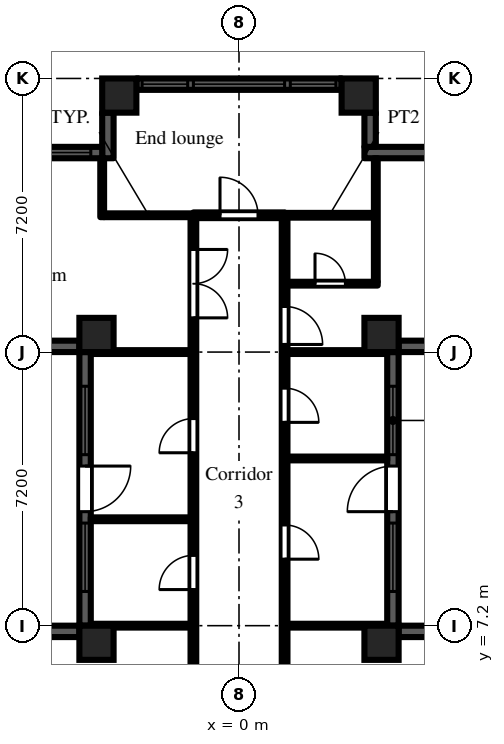
"""IFC4 building model, lengths in metres.
Left out: names, types, materials, properties, quantities, classifications, styles, units other than length and angle.
Written with IfcOpenShell. Run it as: python <this file> out.ifc"""

import sys

from ifc_helpers import new_model, si_unit, direction, frame, frame_2d, origin, origin_2d, place, context, subcontext, project, spatial, rectangle, extrude, element, fill, save


model = new_model("IFC4")
c1 = context("Model", 3, precision=1e-05, world=origin(), true_north=direction((0.0, 1.0)))
c2 = subcontext(c1, "Body", "Model", "MODEL_VIEW")
j1 = project(units=[si_unit("LENGTHUNIT", "METRE"), si_unit("PLANEANGLEUNIT", "RADIAN")], contexts=[c1])
p1 = place(None, origin())
s1 = spatial("IfcSite", under=j1, at=p1, CompositionType="ELEMENT")
p2 = place(p1, origin())
s2 = spatial("IfcBuilding", under=s1, at=p2, CompositionType="ELEMENT")
p3 = place(p2, frame((0.0, 0.0, 108.9)))
s3 = spatial("IfcBuildingStorey", under=s2, at=p3, CompositionType="ELEMENT", Elevation=108.9)
for number, where, z_axis, x_axis in (
    (1, (-3.75, 6.75, 0.0), (0.0, 0.0, 1.0), (1.0, 0.0, 0.0)),
    (2, (-3.75, 14.85, 0.0), (0.0, 0.0, 1.0), (1.0, 0.0, 0.0)),
    (3, (-3.15, 21.15, 0.0), (0.0, 0.0, 1.0), (1.0, 0.0, 0.0)),
    (4, (3.15, 21.15, 0.0), (0.0, 0.0, 1.0), (1.0, 0.0, 0.0)),
    (5, (3.75, 6.75, 0.0), (0.0, 0.0, 1.0), (1.0, 0.0, 0.0)),
    (6, (3.75, 14.85, 0.0), (0.0, 0.0, 1.0), (1.0, 0.0, 0.0)),
):
    element("IfcColumn", number, at=place(p3, frame(where, z_axis=z_axis, x_axis=x_axis)), inside=s3, PredefinedType="COLUMN", context=c2, shape_type="SweptSolid", body=[
        extrude(rectangle(XDim=0.9, YDim=0.9, at=origin_2d()), origin(), (0.0, 0.0, 1.0), 3.0),
    ])
p4 = place(p3, frame((7.2, 7.05, 0.0), z_axis=(0.0, 0.0, 1.0), x_axis=(-1.0, 0.0, 0.0)))
e7 = element("IfcWall", 7, at=p4, inside=s3, PredefinedType="SOLIDWALL", context=c2, shape_type="SweptSolid", body=[
    extrude(rectangle(XDim=3.0, YDim=0.3, at=frame_2d((1.5, 0.0))), origin(), (0.0, 0.0, 1.0), 2.55),
])
p5 = place(p3, frame((4.05, 7.2, 0.0), z_axis=(0.0, 0.0, 1.0), x_axis=(0.0, 1.0, 0.0)))
e8 = element("IfcWall", 8, at=p5, inside=s3, PredefinedType="SOLIDWALL", context=c2, shape_type="SweptSolid", body=[
    extrude(rectangle(XDim=7.2, YDim=0.3, at=frame_2d((3.6, 0.0))), origin(), (0.0, 0.0, 1.0), 2.55),
])
p6 = place(p5, frame((3.0, 0.0, 0.0)))
e9 = element("IfcOpeningElement", 9, at=p6, cuts=e8, PredefinedType="OPENING", context=c2, shape_type="SweptSolid", body=[
    extrude(rectangle(XDim=1.2, YDim=2.05, at=frame_2d((0.6, 1.025))), frame((0.0, 0.16, 0.0), z_axis=(0.0, -1.0, 0.0), x_axis=(1.0, 0.0, 0.0)), (0.0, 0.0, 1.0), 0.32),
])
p7 = place(p5, frame((0.9, 0.0, 0.2)))
e10 = element("IfcOpeningElement", 10, at=p7, cuts=e8, PredefinedType="OPENING", context=c2, shape_type="SweptSolid", body=[
    extrude(rectangle(XDim=1.8, YDim=1.85, at=frame_2d((0.9, 0.925))), frame((0.0, 0.16, 0.0), z_axis=(0.0, -1.0, 0.0), x_axis=(1.0, 0.0, 0.0)), (0.0, 0.0, 1.0), 0.32),
])
p8 = place(p5, frame((4.5, 0.0, 0.2)))
e11 = element("IfcOpeningElement", 11, at=p8, cuts=e8, PredefinedType="OPENING", context=c2, shape_type="SweptSolid", body=[
    extrude(rectangle(XDim=1.8, YDim=1.85, at=frame_2d((0.9, 0.925))), frame((0.0, 0.16, 0.0), z_axis=(0.0, -1.0, 0.0), x_axis=(1.0, 0.0, 0.0)), (0.0, 0.0, 1.0), 0.32),
])
p9 = place(p3, frame((4.2, 14.55, 0.0), z_axis=(0.0, 0.0, 1.0), x_axis=(1.0, 0.0, 0.0)))
e12 = element("IfcWall", 12, at=p9, inside=s3, PredefinedType="SOLIDWALL", context=c2, shape_type="SweptSolid", body=[
    extrude(rectangle(XDim=2.1, YDim=0.3, at=frame_2d((1.05, 0.0))), origin(), (0.0, 0.0, 1.0), 2.55),
])
p10 = place(p3, frame((5.1, 19.65, 0.0), z_axis=(0.0, 0.0, 1.0), x_axis=(-1.0, 0.0, 0.0)))
e13 = element("IfcWall", 13, at=p10, inside=s3, PredefinedType="SOLIDWALL", context=c2, shape_type="SweptSolid", body=[
    extrude(rectangle(XDim=1.8, YDim=0.3, at=frame_2d((0.9, 0.0))), origin(), (0.0, 0.0, 1.0), 2.55),
])
p11 = place(p3, frame((3.45, 19.8, 0.0), z_axis=(0.0, 0.0, 1.0), x_axis=(0.0, 1.0, 0.0)))
e14 = element("IfcWall", 14, at=p11, inside=s3, PredefinedType="SOLIDWALL", context=c2, shape_type="SweptSolid", body=[
    extrude(rectangle(XDim=0.9, YDim=0.3, at=frame_2d((0.45, 0.0))), origin(), (0.0, 0.0, 1.0), 2.55),
])
p12 = place(p3, frame((2.7, 21.45, 0.0), z_axis=(0.0, 0.0, 1.0), x_axis=(-1.0, 0.0, 0.0)))
e15 = element("IfcWall", 15, at=p12, inside=s3, PredefinedType="SOLIDWALL", context=c2, shape_type="SweptSolid", body=[
    extrude(rectangle(XDim=5.4, YDim=0.3, at=frame_2d((2.7, 0.0))), origin(), (0.0, 0.0, 1.0), 2.2),
])
p13 = place(p12, frame((1.5, 0.0, 0.2)))
e16 = element("IfcOpeningElement", 16, at=p13, cuts=e15, PredefinedType="OPENING", context=c2, shape_type="SweptSolid", body=[
    extrude(rectangle(XDim=2.4, YDim=1.85, at=frame_2d((1.2, 0.925))), frame((0.0, 0.16, 0.0), z_axis=(0.0, -1.0, 0.0), x_axis=(1.0, 0.0, 0.0)), (0.0, 0.0, 1.0), 0.32),
])
p14 = place(p12, frame((0.15, 0.0, 0.2)))
e17 = element("IfcOpeningElement", 17, at=p14, cuts=e15, PredefinedType="OPENING", context=c2, shape_type="SweptSolid", body=[
    extrude(rectangle(XDim=1.2, YDim=1.85, at=frame_2d((0.6, 0.925))), frame((0.0, 0.16, 0.0), z_axis=(0.0, -1.0, 0.0), x_axis=(1.0, 0.0, 0.0)), (0.0, 0.0, 1.0), 0.32),
])
p15 = place(p12, frame((4.05, 0.0, 0.2)))
e18 = element("IfcOpeningElement", 18, at=p15, cuts=e15, PredefinedType="OPENING", context=c2, shape_type="SweptSolid", body=[
    extrude(rectangle(XDim=1.2, YDim=1.85, at=frame_2d((0.6, 0.925))), frame((0.0, 0.16, 0.0), z_axis=(0.0, -1.0, 0.0), x_axis=(1.0, 0.0, 0.0)), (0.0, 0.0, 1.0), 0.32),
])
p16 = place(p3, frame((-3.45, 20.7, 0.0), z_axis=(0.0, 0.0, 1.0), x_axis=(0.0, -1.0, 0.0)))
e19 = element("IfcWall", 19, at=p16, inside=s3, PredefinedType="SOLIDWALL", context=c2, shape_type="SweptSolid", body=[
    extrude(rectangle(XDim=1.2, YDim=0.3, at=frame_2d((0.6, 0.0))), origin(), (0.0, 0.0, 1.0), 2.55),
])
p17 = place(p3, frame((-3.6, 19.65, 0.0), z_axis=(0.0, 0.0, 1.0), x_axis=(-1.0, 0.0, 0.0)))
e20 = element("IfcWall", 20, at=p17, inside=s3, PredefinedType="SOLIDWALL", context=c2, shape_type="SweptSolid", body=[
    extrude(rectangle(XDim=1.8, YDim=0.3, at=frame_2d((0.9, 0.0))), origin(), (0.0, 0.0, 1.0), 2.55),
])
p18 = place(p17, frame((0.3, 0.0, 0.2)))
e21 = element("IfcOpeningElement", 21, at=p18, cuts=e20, PredefinedType="OPENING", context=c2, shape_type="SweptSolid", body=[
    extrude(rectangle(XDim=1.2, YDim=1.85, at=frame_2d((0.6, 0.925))), frame((0.0, 0.16, 0.0), z_axis=(0.0, -1.0, 0.0), x_axis=(1.0, 0.0, 0.0)), (0.0, 0.0, 1.0), 0.32),
])
p19 = place(p3, frame((-6.3, 14.55, 0.0), z_axis=(0.0, 0.0, 1.0), x_axis=(1.0, 0.0, 0.0)))
e22 = element("IfcWall", 22, at=p19, inside=s3, PredefinedType="SOLIDWALL", context=c2, shape_type="SweptSolid", body=[
    extrude(rectangle(XDim=2.1, YDim=0.3, at=frame_2d((1.05, 0.0))), origin(), (0.0, 0.0, 1.0), 2.55),
])
p20 = place(p3, frame((-4.05, 14.4, 0.0), z_axis=(0.0, 0.0, 1.0), x_axis=(0.0, -1.0, 0.0)))
e23 = element("IfcWall", 23, at=p20, inside=s3, PredefinedType="SOLIDWALL", context=c2, shape_type="SweptSolid", body=[
    extrude(rectangle(XDim=7.2, YDim=0.3, at=frame_2d((3.6, 0.0))), origin(), (0.0, 0.0, 1.0), 2.55),
])
p21 = place(p20, frame((3.0, 0.0, 0.0)))
e24 = element("IfcOpeningElement", 24, at=p21, cuts=e23, PredefinedType="OPENING", context=c2, shape_type="SweptSolid", body=[
    extrude(rectangle(XDim=1.2, YDim=2.05, at=frame_2d((0.6, 1.025))), frame((0.0, 0.16, 0.0), z_axis=(0.0, -1.0, 0.0), x_axis=(1.0, 0.0, 0.0)), (0.0, 0.0, 1.0), 0.32),
])
p22 = place(p20, frame((0.9, 0.0, 0.2)))
e25 = element("IfcOpeningElement", 25, at=p22, cuts=e23, PredefinedType="OPENING", context=c2, shape_type="SweptSolid", body=[
    extrude(rectangle(XDim=1.8, YDim=1.85, at=frame_2d((0.9, 0.925))), frame((0.0, 0.16, 0.0), z_axis=(0.0, -1.0, 0.0), x_axis=(1.0, 0.0, 0.0)), (0.0, 0.0, 1.0), 0.32),
])
p23 = place(p20, frame((4.5, 0.0, 0.2)))
e26 = element("IfcOpeningElement", 26, at=p23, cuts=e23, PredefinedType="OPENING", context=c2, shape_type="SweptSolid", body=[
    extrude(rectangle(XDim=1.8, YDim=1.85, at=frame_2d((0.9, 0.925))), frame((0.0, 0.16, 0.0), z_axis=(0.0, -1.0, 0.0), x_axis=(1.0, 0.0, 0.0)), (0.0, 0.0, 1.0), 0.32),
])
p24 = place(p3, frame((-4.2, 7.05, 0.0), z_axis=(0.0, 0.0, 1.0), x_axis=(-1.0, 0.0, 0.0)))
e27 = element("IfcWall", 27, at=p24, inside=s3, PredefinedType="SOLIDWALL", context=c2, shape_type="SweptSolid", body=[
    extrude(rectangle(XDim=3.0, YDim=0.3, at=frame_2d((1.5, 0.0))), origin(), (0.0, 0.0, 1.0), 2.55),
])
for number, where, z_axis, x_axis in (
    (28, (-3.9, 7.2, 0.0), (0.0, 0.0, 1.0), (1.0, 0.0, 0.0)),
    (29, (-3.9, 10.0, 0.0), (0.0, 0.0, 1.0), (1.0, 0.0, 0.0)),
    (30, (-3.9, 14.4, 0.0), (0.0, 0.0, 1.0), (1.0, 0.0, 0.0)),
):
    element("IfcWall", number, at=place(p3, frame(where, z_axis=z_axis, x_axis=x_axis)), inside=s3, PredefinedType="PARTITIONING", context=c2, shape_type="SweptSolid", body=[
        extrude(rectangle(XDim=2.625, YDim=0.1, at=frame_2d((1.312, 0.0))), origin(), (0.0, 0.0, 1.0), 2.55),
    ])
p25 = place(p3, frame((-3.6, 17.95, 0.0), z_axis=(0.0, 0.0, 1.0), x_axis=(0.0, 1.0, 0.0)))
e31 = element("IfcWall", 31, at=p25, inside=s3, PredefinedType="PARTITIONING", context=c2, shape_type="SweptSolid", body=[
    extrude(rectangle(XDim=1.55, YDim=0.1, at=frame_2d((0.775, 0.0))), origin(), (0.0, 0.0, 1.0), 2.55),
])
p26 = place(p3, frame((-3.55, 18.0, 0.0), z_axis=(0.0, 0.0, 1.0), x_axis=(1.0, 0.0, 0.0)))
e32 = element("IfcWall", 32, at=p26, inside=s3, PredefinedType="PARTITIONING", context=c2, shape_type="SweptSolid", body=[
    extrude(rectangle(XDim=2.35, YDim=0.1, at=frame_2d((1.175, 0.0))), origin(), (0.0, 0.0, 1.0), 2.55),
])
p27 = place(p3, frame((-1.2, 1.275, 0.0), z_axis=(0.0, 0.0, 1.0), x_axis=(0.0, 1.0, 0.0)))
e33 = element("IfcWall", 33, at=p27, inside=s3, PredefinedType="PARTITIONING", context=c2, shape_type="SweptSolid", body=[
    extrude(rectangle(XDim=16.65, YDim=0.15, at=frame_2d((8.325, 0.0))), origin(), (0.0, 0.0, 1.0), 2.55),
])
p28 = place(p27, frame((3.575, 0.0, 0.0)))
e34 = element("IfcOpeningElement", 34, at=p28, cuts=e33, PredefinedType="OPENING", context=c2, shape_type="SweptSolid", body=[
    extrude(rectangle(XDim=0.9, YDim=2.1, at=frame_2d((0.45, 1.05))), frame((0.0, 0.085, 0.0), z_axis=(0.0, -1.0, 0.0), x_axis=(1.0, 0.0, 0.0)), (0.0, 0.0, 1.0), 0.17),
])
p29 = place(p27, frame((6.875, 0.0, 0.0)))
e35 = element("IfcOpeningElement", 35, at=p29, cuts=e33, PredefinedType="OPENING", context=c2, shape_type="SweptSolid", body=[
    extrude(rectangle(XDim=0.9, YDim=2.1, at=frame_2d((0.45, 1.05))), frame((0.0, 0.085, 0.0), z_axis=(0.0, -1.0, 0.0), x_axis=(1.0, 0.0, 0.0)), (0.0, 0.0, 1.0), 0.17),
])
p30 = place(p27, frame((10.475, 0.0, 0.0)))
e36 = element("IfcOpeningElement", 36, at=p30, cuts=e33, PredefinedType="OPENING", context=c2, shape_type="SweptSolid", body=[
    extrude(rectangle(XDim=0.9, YDim=2.1, at=frame_2d((0.45, 1.05))), frame((0.0, 0.085, 0.0), z_axis=(0.0, -1.0, 0.0), x_axis=(1.0, 0.0, 0.0)), (0.0, 0.0, 1.0), 0.17),
])
p31 = place(p27, frame((14.025, 0.0, 0.0)))
e37 = element("IfcOpeningElement", 37, at=p31, cuts=e33, PredefinedType="OPENING", context=c2, shape_type="SweptSolid", body=[
    extrude(rectangle(XDim=1.8, YDim=2.1, at=frame_2d((0.9, 1.05))), frame((0.0, 0.085, 0.0), z_axis=(0.0, -1.0, 0.0), x_axis=(1.0, 0.0, 0.0)), (0.0, 0.0, 1.0), 0.17),
])
p32 = place(p3, frame((-1.2, 18.0, 0.0), z_axis=(0.0, 0.0, 1.0), x_axis=(1.0, 0.0, 0.0)))
e38 = element("IfcWall", 38, at=p32, inside=s3, PredefinedType="PARTITIONING", context=c2, shape_type="SweptSolid", body=[
    extrude(rectangle(XDim=2.4, YDim=0.15, at=frame_2d((1.2, 0.0))), origin(), (0.0, 0.0, 1.0), 2.55),
])
p33 = place(p32, frame((0.7, 0.0, 0.0)))
e39 = element("IfcOpeningElement", 39, at=p33, cuts=e38, PredefinedType="OPENING", context=c2, shape_type="SweptSolid", body=[
    extrude(rectangle(XDim=1.0, YDim=2.1, at=frame_2d((0.5, 1.05))), frame((0.0, 0.085, 0.0), z_axis=(0.0, -1.0, 0.0), x_axis=(1.0, 0.0, 0.0)), (0.0, 0.0, 1.0), 0.17),
])
p34 = place(p3, frame((1.2, 1.125, 0.0), z_axis=(0.0, 0.0, 1.0), x_axis=(0.0, 1.0, 0.0)))
e40 = element("IfcWall", 40, at=p34, inside=s3, PredefinedType="PARTITIONING", context=c2, shape_type="SweptSolid", body=[
    extrude(rectangle(XDim=16.8, YDim=0.15, at=frame_2d((8.4, 0.0))), origin(), (0.0, 0.0, 1.0), 2.55),
])
p35 = place(p34, frame((3.725, 0.0, 0.0)))
e41 = element("IfcOpeningElement", 41, at=p35, cuts=e40, PredefinedType="OPENING", context=c2, shape_type="SweptSolid", body=[
    extrude(rectangle(XDim=0.9, YDim=2.1, at=frame_2d((0.45, 1.05))), frame((0.0, 0.085, 0.0), z_axis=(0.0, -1.0, 0.0), x_axis=(1.0, 0.0, 0.0)), (0.0, 0.0, 1.0), 0.17),
])
p36 = place(p34, frame((11.425, 0.0, 0.0)))
e42 = element("IfcOpeningElement", 42, at=p36, cuts=e40, PredefinedType="OPENING", context=c2, shape_type="SweptSolid", body=[
    extrude(rectangle(XDim=0.9, YDim=2.1, at=frame_2d((0.45, 1.05))), frame((0.0, 0.085, 0.0), z_axis=(0.0, -1.0, 0.0), x_axis=(1.0, 0.0, 0.0)), (0.0, 0.0, 1.0), 0.17),
])
p37 = place(p34, frame((7.825, 0.0, 0.0)))
e43 = element("IfcOpeningElement", 43, at=p37, cuts=e40, PredefinedType="OPENING", context=c2, shape_type="SweptSolid", body=[
    extrude(rectangle(XDim=0.9, YDim=2.1, at=frame_2d((0.45, 1.05))), frame((0.0, 0.085, 0.0), z_axis=(0.0, -1.0, 0.0), x_axis=(1.0, 0.0, 0.0)), (0.0, 0.0, 1.0), 0.17),
])
p38 = place(p34, frame((13.475, 0.0, 0.0)))
e44 = element("IfcOpeningElement", 44, at=p38, cuts=e40, PredefinedType="OPENING", context=c2, shape_type="SweptSolid", body=[
    extrude(rectangle(XDim=1.0, YDim=2.1, at=frame_2d((0.5, 1.05))), frame((0.0, 0.085, 0.0), z_axis=(0.0, -1.0, 0.0), x_axis=(1.0, 0.0, 0.0)), (0.0, 0.0, 1.0), 0.17),
])
for number, where, z_axis, x_axis in (
    (45, (1.275, 7.2, 0.0), (0.0, 0.0, 1.0), (1.0, 0.0, 0.0)),
    (46, (1.275, 11.6, 0.0), (0.0, 0.0, 1.0), (1.0, 0.0, 0.0)),
    (47, (1.275, 14.4, 0.0), (0.0, 0.0, 1.0), (1.0, 0.0, 0.0)),
):
    element("IfcWall", number, at=place(p3, frame(where, z_axis=z_axis, x_axis=x_axis)), inside=s3, PredefinedType="PARTITIONING", context=c2, shape_type="SweptSolid", body=[
        extrude(rectangle(XDim=2.625, YDim=0.1, at=frame_2d((1.312, 0.0))), origin(), (0.0, 0.0, 1.0), 2.55),
    ])
p39 = place(p3, frame((1.275, 16.2, 0.0), z_axis=(0.0, 0.0, 1.0), x_axis=(1.0, 0.0, 0.0)))
e48 = element("IfcWall", 48, at=p39, inside=s3, PredefinedType="PARTITIONING", context=c2, shape_type="SweptSolid", body=[
    extrude(rectangle(XDim=2.375, YDim=0.1, at=frame_2d((1.188, 0.0))), origin(), (0.0, 0.0, 1.0), 2.55),
])
p40 = place(p39, frame((0.725, 0.0, 0.0)))
e49 = element("IfcOpeningElement", 49, at=p40, cuts=e48, PredefinedType="OPENING", context=c2, shape_type="SweptSolid", body=[
    extrude(rectangle(XDim=0.8, YDim=2.1, at=frame_2d((0.4, 1.05))), frame((0.0, 0.06, 0.0), z_axis=(0.0, -1.0, 0.0), x_axis=(1.0, 0.0, 0.0)), (0.0, 0.0, 1.0), 0.12),
])
p41 = place(p3, frame((1.2, 18.0, 0.0), z_axis=(0.0, 0.0, 1.0), x_axis=(1.0, 0.0, 0.0)))
e50 = element("IfcWall", 50, at=p41, inside=s3, PredefinedType="PARTITIONING", context=c2, shape_type="SweptSolid", body=[
    extrude(rectangle(XDim=2.35, YDim=0.125, at=frame_2d((1.175, 0.0))), origin(), (0.0, 0.0, 1.0), 2.55),
])
p42 = place(p3, frame((3.6, 16.25, 0.0), z_axis=(0.0, 0.0, 1.0), x_axis=(0.0, 1.0, 0.0)))
e51 = element("IfcWall", 51, at=p42, inside=s3, PredefinedType="PARTITIONING", context=c2, shape_type="SweptSolid", body=[
    extrude(rectangle(XDim=3.25, YDim=0.1, at=frame_2d((1.625, 0.0))), origin(), (0.0, 0.0, 1.0), 2.55),
])
p43 = place(p6, origin())
e52 = element("IfcDoor", 52, at=p43, inside=s3, OperationType="SINGLE_SWING_LEFT", PredefinedType="DOOR", context=c2, shape_type="SweptSolid", body=[
    extrude(rectangle(XDim=1.2, YDim=2.05, at=frame_2d((0.6, 1.025))), frame((0.0, 0.025, 0.0), z_axis=(0.0, -1.0, 0.0), x_axis=(1.0, 0.0, 0.0)), (0.0, 0.0, 1.0), 0.05),
])
fill(e9, e52)
p44 = place(p7, origin())
e53 = element("IfcWindow", 53, at=p44, inside=s3, PartitioningType="SINGLE_PANEL", PredefinedType="WINDOW", context=c2, shape_type="SweptSolid", body=[
    extrude(rectangle(XDim=1.8, YDim=1.85, at=frame_2d((0.9, 0.925))), frame((0.0, 0.03, 0.0), z_axis=(0.0, -1.0, 0.0), x_axis=(1.0, 0.0, 0.0)), (0.0, 0.0, 1.0), 0.06),
])
fill(e10, e53)
p45 = place(p8, origin())
e54 = element("IfcWindow", 54, at=p45, inside=s3, PartitioningType="SINGLE_PANEL", PredefinedType="WINDOW", context=c2, shape_type="SweptSolid", body=[
    extrude(rectangle(XDim=1.8, YDim=1.85, at=frame_2d((0.9, 0.925))), frame((0.0, 0.03, 0.0), z_axis=(0.0, -1.0, 0.0), x_axis=(1.0, 0.0, 0.0)), (0.0, 0.0, 1.0), 0.06),
])
fill(e11, e54)
p46 = place(p13, origin())
e55 = element("IfcWindow", 55, at=p46, inside=s3, PartitioningType="SINGLE_PANEL", PredefinedType="WINDOW", context=c2, shape_type="SweptSolid", body=[
    extrude(rectangle(XDim=2.4, YDim=1.85, at=frame_2d((1.2, 0.925))), frame((0.0, 0.03, 0.0), z_axis=(0.0, -1.0, 0.0), x_axis=(1.0, 0.0, 0.0)), (0.0, 0.0, 1.0), 0.06),
])
fill(e16, e55)
p47 = place(p14, origin())
e56 = element("IfcWindow", 56, at=p47, inside=s3, PartitioningType="SINGLE_PANEL", PredefinedType="WINDOW", context=c2, shape_type="SweptSolid", body=[
    extrude(rectangle(XDim=1.2, YDim=1.85, at=frame_2d((0.6, 0.925))), frame((0.0, 0.03, 0.0), z_axis=(0.0, -1.0, 0.0), x_axis=(1.0, 0.0, 0.0)), (0.0, 0.0, 1.0), 0.06),
])
fill(e17, e56)
p48 = place(p15, origin())
e57 = element("IfcWindow", 57, at=p48, inside=s3, PartitioningType="SINGLE_PANEL", PredefinedType="WINDOW", context=c2, shape_type="SweptSolid", body=[
    extrude(rectangle(XDim=1.2, YDim=1.85, at=frame_2d((0.6, 0.925))), frame((0.0, 0.03, 0.0), z_axis=(0.0, -1.0, 0.0), x_axis=(1.0, 0.0, 0.0)), (0.0, 0.0, 1.0), 0.06),
])
fill(e18, e57)
p49 = place(p18, origin())
e58 = element("IfcWindow", 58, at=p49, inside=s3, PartitioningType="SINGLE_PANEL", PredefinedType="WINDOW", context=c2, shape_type="SweptSolid", body=[
    extrude(rectangle(XDim=1.2, YDim=1.85, at=frame_2d((0.6, 0.925))), frame((0.0, 0.03, 0.0), z_axis=(0.0, -1.0, 0.0), x_axis=(1.0, 0.0, 0.0)), (0.0, 0.0, 1.0), 0.06),
])
fill(e21, e58)
p50 = place(p21, origin())
e59 = element("IfcDoor", 59, at=p50, inside=s3, OperationType="SINGLE_SWING_LEFT", PredefinedType="DOOR", context=c2, shape_type="SweptSolid", body=[
    extrude(rectangle(XDim=1.2, YDim=2.05, at=frame_2d((0.6, 1.025))), frame((0.0, 0.025, 0.0), z_axis=(0.0, -1.0, 0.0), x_axis=(1.0, 0.0, 0.0)), (0.0, 0.0, 1.0), 0.05),
])
fill(e24, e59)
p51 = place(p22, origin())
e60 = element("IfcWindow", 60, at=p51, inside=s3, PartitioningType="SINGLE_PANEL", PredefinedType="WINDOW", context=c2, shape_type="SweptSolid", body=[
    extrude(rectangle(XDim=1.8, YDim=1.85, at=frame_2d((0.9, 0.925))), frame((0.0, 0.03, 0.0), z_axis=(0.0, -1.0, 0.0), x_axis=(1.0, 0.0, 0.0)), (0.0, 0.0, 1.0), 0.06),
])
fill(e25, e60)
p52 = place(p23, origin())
e61 = element("IfcWindow", 61, at=p52, inside=s3, PartitioningType="SINGLE_PANEL", PredefinedType="WINDOW", context=c2, shape_type="SweptSolid", body=[
    extrude(rectangle(XDim=1.8, YDim=1.85, at=frame_2d((0.9, 0.925))), frame((0.0, 0.03, 0.0), z_axis=(0.0, -1.0, 0.0), x_axis=(1.0, 0.0, 0.0)), (0.0, 0.0, 1.0), 0.06),
])
fill(e26, e61)
p53 = place(p33, origin())
e62 = element("IfcDoor", 62, at=p53, inside=s3, OperationType="SINGLE_SWING_LEFT", PredefinedType="DOOR", context=c2, shape_type="SweptSolid", body=[
    extrude(rectangle(XDim=1.0, YDim=2.1, at=frame_2d((0.5, 1.05))), frame((0.0, 0.025, 0.0), z_axis=(0.0, -1.0, 0.0), x_axis=(1.0, 0.0, 0.0)), (0.0, 0.0, 1.0), 0.05),
])
fill(e39, e62)
p54 = place(p29, origin())
e63 = element("IfcDoor", 63, at=p54, inside=s3, OperationType="SINGLE_SWING_LEFT", PredefinedType="DOOR", context=c2, shape_type="SweptSolid", body=[
    extrude(rectangle(XDim=0.9, YDim=2.1, at=frame_2d((0.45, 1.05))), frame((0.0, 0.025, 0.0), z_axis=(0.0, -1.0, 0.0), x_axis=(1.0, 0.0, 0.0)), (0.0, 0.0, 1.0), 0.05),
])
fill(e35, e63)
p55 = place(p30, origin())
e64 = element("IfcDoor", 64, at=p55, inside=s3, OperationType="SINGLE_SWING_LEFT", PredefinedType="DOOR", context=c2, shape_type="SweptSolid", body=[
    extrude(rectangle(XDim=0.9, YDim=2.1, at=frame_2d((0.45, 1.05))), frame((0.0, 0.025, 0.0), z_axis=(0.0, -1.0, 0.0), x_axis=(1.0, 0.0, 0.0)), (0.0, 0.0, 1.0), 0.05),
])
fill(e36, e64)
p56 = place(p31, frame((1.8, 0.0, 0.0), z_axis=(0.0, 0.0, 1.0), x_axis=(-1.0, 0.0, 0.0)))
e65 = element("IfcDoor", 65, at=p56, inside=s3, OperationType="DOUBLE_DOOR_DOUBLE_SWING", PredefinedType="DOOR", context=c2, shape_type="SweptSolid", body=[
    extrude(rectangle(XDim=1.8, YDim=2.1, at=frame_2d((0.9, 1.05))), frame((0.0, 0.025, 0.0), z_axis=(0.0, -1.0, 0.0), x_axis=(1.0, 0.0, 0.0)), (0.0, 0.0, 1.0), 0.05),
])
fill(e37, e65)
p57 = place(p36, frame((0.9, 0.0, 0.0), z_axis=(0.0, 0.0, 1.0), x_axis=(-1.0, 0.0, 0.0)))
e66 = element("IfcDoor", 66, at=p57, inside=s3, OperationType="SINGLE_SWING_RIGHT", PredefinedType="DOOR", context=c2, shape_type="SweptSolid", body=[
    extrude(rectangle(XDim=0.9, YDim=2.1, at=frame_2d((0.45, 1.05))), frame((0.0, 0.025, 0.0), z_axis=(0.0, -1.0, 0.0), x_axis=(1.0, 0.0, 0.0)), (0.0, 0.0, 1.0), 0.05),
])
fill(e42, e66)
p58 = place(p37, frame((0.9, 0.0, 0.0), z_axis=(0.0, 0.0, 1.0), x_axis=(-1.0, 0.0, 0.0)))
e67 = element("IfcDoor", 67, at=p58, inside=s3, OperationType="SINGLE_SWING_RIGHT", PredefinedType="DOOR", context=c2, shape_type="SweptSolid", body=[
    extrude(rectangle(XDim=0.9, YDim=2.1, at=frame_2d((0.45, 1.05))), frame((0.0, 0.025, 0.0), z_axis=(0.0, -1.0, 0.0), x_axis=(1.0, 0.0, 0.0)), (0.0, 0.0, 1.0), 0.05),
])
fill(e43, e67)
p59 = place(p40, origin())
e68 = element("IfcDoor", 68, at=p59, inside=s3, OperationType="SINGLE_SWING_LEFT", PredefinedType="DOOR", context=c2, shape_type="SweptSolid", body=[
    extrude(rectangle(XDim=0.8, YDim=2.1, at=frame_2d((0.4, 1.05))), frame((0.0, 0.025, 0.0), z_axis=(0.0, -1.0, 0.0), x_axis=(1.0, 0.0, 0.0)), (0.0, 0.0, 1.0), 0.05),
])
fill(e49, e68)
p60 = place(p38, frame((1.0, 0.0, 0.0), z_axis=(0.0, 0.0, 1.0), x_axis=(-1.0, 0.0, 0.0)))
e69 = element("IfcDoor", 69, at=p60, inside=s3, OperationType="SINGLE_SWING_RIGHT", PredefinedType="DOOR", context=c2, shape_type="SweptSolid", body=[
    extrude(rectangle(XDim=1.0, YDim=2.1, at=frame_2d((0.5, 1.05))), frame((0.0, 0.025, 0.0), z_axis=(0.0, -1.0, 0.0), x_axis=(1.0, 0.0, 0.0)), (0.0, 0.0, 1.0), 0.05),
])
fill(e44, e69)
save(model, sys.argv[1])
